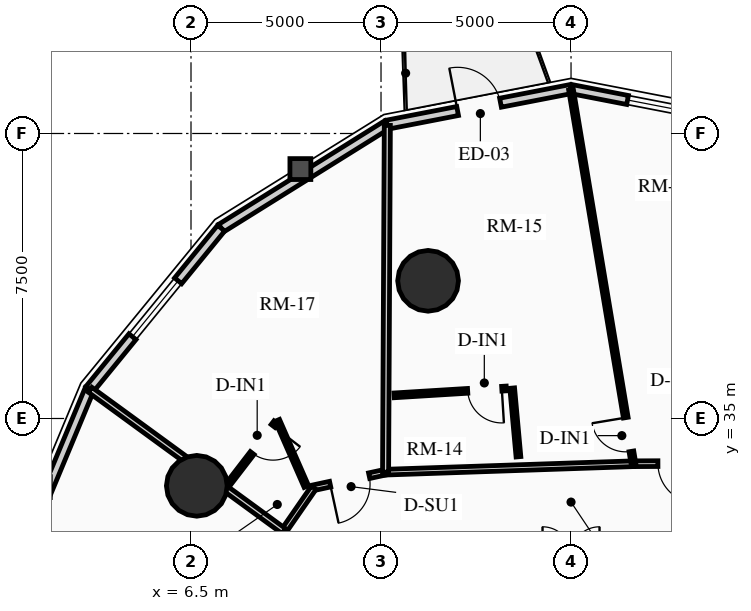
"""IFC4 building model, lengths in metres.
Left out: names, types, materials, properties, quantities, classifications, styles, units other than length and angle.
Written with IfcOpenShell. Run it as: python <this file> out.ifc"""

import sys

from ifc_helpers import new_model, si_unit, direction, frame, frame_2d, origin, origin_2d, place, context, subcontext, project, spatial, rectangle, circle, extrude, source, transform, mapped, element, fill, save


model = new_model("IFC4")
c1 = context("Model", 3, precision=1e-05, world=origin(), true_north=direction((0.0, 1.0)))
c2 = subcontext(c1, "Body", "Model", "MODEL_VIEW")
j1 = project(units=[si_unit("LENGTHUNIT", "METRE"), si_unit("PLANEANGLEUNIT", "RADIAN")], contexts=[c1])
p1 = place(None, origin())
s1 = spatial("IfcSite", under=j1, at=p1, CompositionType="ELEMENT")
p2 = place(p1, origin())
s2 = spatial("IfcBuilding", under=s1, at=p2, CompositionType="ELEMENT")
p3 = place(p2, frame((0.0, 0.0, 51.1)))
s3 = spatial("IfcBuildingStorey", under=s2, at=p3, CompositionType="ELEMENT", Elevation=51.1)
for number, where, z_axis, x_axis in (
    (1, (12.739, 38.623, 0.0), (0.0, 0.0, 1.0), (1.0, 0.0, 0.0)),
    (2, (6.653, 33.229, 0.0), (0.0, 0.0, 1.0), (1.0, 0.0, 0.0)),
):
    element("IfcColumn", number, at=place(p3, frame(where, z_axis=z_axis, x_axis=x_axis)), inside=s3, PredefinedType="USERDEFINED", context=c2, shape_type="SweptSolid", body=[
        extrude(circle(Radius=0.8, at=origin_2d()), origin(), (0.0, 0.0, 1.0), 2.91),
    ])
p4 = place(p3, frame((16.5, 43.67, 0.0), z_axis=(0.0, 0.0, 1.0), x_axis=(0.981725274071, -0.190303668512, 0.0)))
e3 = element("IfcWall", 3, at=p4, inside=s3, PredefinedType="SOLIDWALL", context=c2, shape_type="SweptSolid", body=[
    extrude(rectangle(XDim=4.93, YDim=0.24, at=frame_2d((2.465, 0.0))), origin(), (0.0, 0.0, 1.0), 2.073),
])
m1 = source(origin(), c2, "Body", "SweptSolid", [
    extrude(rectangle(XDim=1.9, YDim=1.35, at=frame_2d((0.95, 0.675))), frame((0.0, 0.13, 0.0), z_axis=(0.0, -1.0, 0.0), x_axis=(1.0, 0.0, 0.0)), (0.0, 0.0, 1.0), 0.26),
])
p5 = place(p4, frame((1.515, 0.0, 0.65)))
e4 = element("IfcOpeningElement", 4, at=p5, cuts=e3, PredefinedType="OPENING", context=c2, shape_type="MappedRepresentation", body=[
    mapped(m1, transform((0.0, 0.0, 0.0), x_axis=(1.0, 0.0, 0.0), y_axis=(0.0, 1.0, 0.0), z_axis=(0.0, 0.0, 1.0), scale=1.0)),
])
p6 = place(p3, frame((11.66, 42.732, 0.0), z_axis=(0.0, 0.0, 1.0), x_axis=(0.981725274071, 0.190303668512, 0.0)))
e5 = element("IfcWall", 5, at=p6, inside=s3, PredefinedType="SOLIDWALL", context=c2, shape_type="SweptSolid", body=[
    extrude(rectangle(XDim=4.93, YDim=0.24, at=frame_2d((2.465, 0.0))), origin(), (0.0, 0.0, 1.0), 2.073),
])
m2 = source(origin(), c2, "Body", "SweptSolid", [
    extrude(rectangle(XDim=1.15, YDim=2.005, at=frame_2d((0.575, 1.002))), frame((0.0, 0.13, 0.0), z_axis=(0.0, -1.0, 0.0), x_axis=(1.0, 0.0, 0.0)), (0.0, 0.0, 1.0), 0.26),
])
p7 = place(p6, frame((1.89, 0.0, 0.0)))
e6 = element("IfcOpeningElement", 6, at=p7, cuts=e5, PredefinedType="OPENING", context=c2, shape_type="MappedRepresentation", body=[
    mapped(m2, transform((0.0, 0.0, 0.0), x_axis=(1.0, 0.0, 0.0), y_axis=(0.0, 1.0, 0.0), z_axis=(0.0, 0.0, 1.0), scale=1.0)),
])
p8 = place(p3, frame((7.293, 40.009, 0.0), z_axis=(0.0, 0.0, 1.0), x_axis=(0.848533613342, 0.529141481107, 0.0)))
e7 = element("IfcWall", 7, at=p8, inside=s3, PredefinedType="SOLIDWALL", context=c2, shape_type="SweptSolid", body=[
    extrude(rectangle(XDim=5.146, YDim=0.24, at=frame_2d((2.573, 0.0))), origin(), (0.0, 0.0, 1.0), 2.073),
])
p9 = place(p3, frame((3.828, 35.768, 0.0), z_axis=(0.0, 0.0, 1.0), x_axis=(0.632713287022, 0.77438614168, 0.0)))
e8 = element("IfcWall", 8, at=p9, inside=s3, PredefinedType="SOLIDWALL", context=c2, shape_type="SweptSolid", body=[
    extrude(rectangle(XDim=5.477, YDim=0.24, at=frame_2d((2.738, 0.0))), origin(), (0.0, 0.0, 1.0), 2.073),
])
p10 = place(p9, frame((1.788, 0.0, 0.65)))
e9 = element("IfcOpeningElement", 9, at=p10, cuts=e8, PredefinedType="OPENING", context=c2, shape_type="MappedRepresentation", body=[
    mapped(m1, transform((0.0, 0.0, 0.0), x_axis=(1.0, 0.0, 0.0), y_axis=(0.0, 1.0, 0.0), z_axis=(0.0, 0.0, 1.0), scale=1.0)),
])
p11 = place(p3, frame((1.604, 30.424, 0.0), z_axis=(0.0, 0.0, 1.0), x_axis=(0.384348836956, 0.923187939442, 0.0)))
e10 = element("IfcWall", 10, at=p11, inside=s3, PredefinedType="SOLIDWALL", context=c2, shape_type="SweptSolid", body=[
    extrude(rectangle(XDim=5.789, YDim=0.24, at=frame_2d((2.894, 0.0))), origin(), (0.0, 0.0, 1.0), 2.073),
])
p12 = place(p3, frame((21.527, 33.824, 0.0), z_axis=(0.0, 0.0, 1.0), x_axis=(-0.999990631344, -0.00432865146, 0.0)))
e11 = element("IfcWall", 11, at=p12, inside=s3, PredefinedType="PARTITIONING", context=c2, shape_type="SweptSolid", body=[
    extrude(rectangle(XDim=3.384, YDim=0.15, at=frame_2d((1.692, 0.0))), origin(), (0.0, 0.0, 1.0), 2.159),
])
m3 = source(origin(), c2, "Body", "SweptSolid", [
    extrude(rectangle(XDim=1.05, YDim=2.015, at=frame_2d((0.525, 1.007))), frame((0.0, 0.085, 0.0), z_axis=(0.0, -1.0, 0.0), x_axis=(1.0, 0.0, 0.0)), (0.0, 0.0, 1.0), 0.17),
])
p13 = place(p12, frame((1.69, 0.0, 0.0)))
e12 = element("IfcOpeningElement", 12, at=p13, cuts=e11, PredefinedType="OPENING", context=c2, shape_type="MappedRepresentation", body=[
    mapped(m3, transform((0.0, 0.0, 0.0), x_axis=(1.0, 0.0, 0.0), y_axis=(0.0, 1.0, 0.0), z_axis=(0.0, 0.0, 1.0), scale=1.0)),
])
p14 = place(p3, frame((18.143, 33.81, 0.0), z_axis=(0.0, 0.0, 1.0), x_axis=(-0.999423023908, -0.033964971394, 0.0)))
e13 = element("IfcWall", 13, at=p14, inside=s3, PredefinedType="PARTITIONING", context=c2, shape_type="SweptSolid", body=[
    extrude(rectangle(XDim=6.527, YDim=0.15, at=frame_2d((3.263, 0.0))), origin(), (0.0, 0.0, 1.0), 2.159),
])
p15 = place(p3, frame((11.62, 33.588, 0.0), z_axis=(0.0, 0.0, 1.0), x_axis=(-0.977392314559, -0.211433827571, 0.0)))
e14 = element("IfcWall", 14, at=p15, inside=s3, PredefinedType="PARTITIONING", context=c2, shape_type="SweptSolid", body=[
    extrude(rectangle(XDim=1.934, YDim=0.15, at=frame_2d((0.967, 0.0))), origin(), (0.0, 0.0, 1.0), 2.159),
])
p16 = place(p15, frame((0.442, 0.0, 0.0)))
e15 = element("IfcOpeningElement", 15, at=p16, cuts=e14, PredefinedType="OPENING", context=c2, shape_type="MappedRepresentation", body=[
    mapped(m3, transform((0.0, 0.0, 0.0), x_axis=(1.0, 0.0, 0.0), y_axis=(0.0, 1.0, 0.0), z_axis=(0.0, 0.0, 1.0), scale=1.0)),
])
p17 = place(p3, frame((9.729, 33.179, 0.0), z_axis=(0.0, 0.0, 1.0), x_axis=(-0.569155068352, -0.822230203878, 0.0)))
e16 = element("IfcWall", 16, at=p17, inside=s3, PredefinedType="PARTITIONING", context=c2, shape_type="SweptSolid", body=[
    extrude(rectangle(XDim=1.387, YDim=0.15, at=frame_2d((0.694, 0.0))), origin(), (0.0, 0.0, 1.0), 2.159),
])
p18 = place(p3, frame((8.94, 32.038, 0.0), z_axis=(0.0, 0.0, 1.0), x_axis=(-0.159917336462, -0.987130409571, 0.0)))
e17 = element("IfcWall", 17, at=p18, inside=s3, PredefinedType="PARTITIONING", context=c2, shape_type="SweptSolid", body=[
    extrude(rectangle(XDim=1.547, YDim=0.15, at=frame_2d((0.773, 0.0))), origin(), (0.0, 0.0, 1.0), 2.205),
])
p19 = place(p18, frame((0.377, 0.0, 0.0)))
e18 = element("IfcOpeningElement", 18, at=p19, cuts=e17, PredefinedType="OPENING", context=c2, shape_type="MappedRepresentation", body=[
    mapped(m3, transform((0.0, 0.0, 0.0), x_axis=(1.0, 0.0, 0.0), y_axis=(0.0, 1.0, 0.0), z_axis=(0.0, 0.0, 1.0), scale=1.0)),
])
p20 = place(p3, frame((11.62, 33.588, 0.0), z_axis=(0.0, 0.0, 1.0), x_axis=(0.005056791532, 0.999987214348, 0.0)))
e19 = element("IfcWall", 19, at=p20, inside=s3, PredefinedType="PARTITIONING", context=c2, shape_type="SweptSolid", body=[
    extrude(rectangle(XDim=9.125, YDim=0.16, at=frame_2d((4.562, 0.0))), origin(), (0.0, 0.0, 1.0), 2.073),
])
p21 = place(p3, frame((8.94, 32.038, 0.0), z_axis=(0.0, 0.0, 1.0), x_axis=(-0.807831293846, 0.58941377714, 0.0)))
e20 = element("IfcWall", 20, at=p21, inside=s3, PredefinedType="PARTITIONING", context=c2, shape_type="SweptSolid", body=[
    extrude(rectangle(XDim=6.308, YDim=0.16, at=frame_2d((3.154, 0.0))), origin(), (0.0, 0.0, 1.0), 2.073),
])
p22 = place(p3, frame((18.143, 33.81, 0.0), z_axis=(0.0, 0.0, 1.0), x_axis=(-0.164668829219, 0.986348912243, 0.0)))
e21 = element("IfcWall", 21, at=p22, inside=s3, PredefinedType="PARTITIONING", context=c2, shape_type="SweptSolid", body=[
    extrude(rectangle(XDim=9.977, YDim=0.125, at=frame_2d((4.988, 0.0))), origin(), (0.0, 0.0, 1.0), 2.073),
])
m4 = source(origin(), c2, "Body", "SweptSolid", [
    extrude(rectangle(XDim=0.9, YDim=2.005, at=frame_2d((0.45, 1.002))), frame((0.0, 0.073, 0.0), z_axis=(0.0, -1.0, 0.0), x_axis=(1.0, 0.0, 0.0)), (0.0, 0.0, 1.0), 0.145),
])
p23 = place(p22, frame((0.33, 0.0, 0.0)))
e22 = element("IfcOpeningElement", 22, at=p23, cuts=e21, PredefinedType="OPENING", context=c2, shape_type="MappedRepresentation", body=[
    mapped(m4, transform((0.0, 0.0, 0.0), x_axis=(1.0, 0.0, 0.0), y_axis=(0.0, 1.0, 0.0), z_axis=(0.0, 0.0, 1.0), scale=1.0)),
])
p24 = place(p3, frame((15.116, 33.993, 0.0), z_axis=(0.0, 0.0, 1.0), x_axis=(-0.090547877021, 0.995892103577, 0.0)))
e23 = element("IfcWall", 23, at=p24, inside=s3, PredefinedType="PARTITIONING", context=c2, shape_type="SweptSolid", body=[
    extrude(rectangle(XDim=1.815, YDim=0.125, at=frame_2d((0.907, 0.0))), origin(), (0.0, 0.0, 1.0), 2.635),
])
p25 = place(p3, frame((14.798, 35.791, 0.0), z_axis=(0.0, 0.0, 1.0), x_axis=(-0.998108365817, -0.06147918417, 0.0)))
e24 = element("IfcWall", 24, at=p25, inside=s3, PredefinedType="PARTITIONING", context=c2, shape_type="SweptSolid", body=[
    extrude(rectangle(XDim=2.958, YDim=0.125, at=frame_2d((1.479, 0.0))), origin(), (0.0, 0.0, 1.0), 2.159),
])
p26 = place(p25, frame((0.12, 0.0, 0.0)))
e25 = element("IfcOpeningElement", 25, at=p26, cuts=e24, PredefinedType="OPENING", context=c2, shape_type="MappedRepresentation", body=[
    mapped(m4, transform((0.0, 0.0, 0.0), x_axis=(1.0, 0.0, 0.0), y_axis=(0.0, 1.0, 0.0), z_axis=(0.0, 0.0, 1.0), scale=1.0)),
])
p27 = place(p3, frame((9.535, 33.211, 0.0), z_axis=(0.0, 0.0, 1.0), x_axis=(-0.401687955793, 0.915776602765, 0.0)))
e26 = element("IfcWall", 26, at=p27, inside=s3, PredefinedType="PARTITIONING", context=c2, shape_type="SweptSolid", body=[
    extrude(rectangle(XDim=1.901, YDim=0.125, at=frame_2d((0.95, 0.0))), origin(), (0.0, 0.0, 1.0), 2.635),
])
p28 = place(p3, frame((8.732, 34.899, 0.0), z_axis=(0.0, 0.0, 1.0), x_axis=(-0.609677010074, -0.792649950096, 0.0)))
e27 = element("IfcWall", 27, at=p28, inside=s3, PredefinedType="PARTITIONING", context=c2, shape_type="SweptSolid", body=[
    extrude(rectangle(XDim=2.097, YDim=0.125, at=frame_2d((1.049, 0.0))), origin(), (0.0, 0.0, 1.0), 2.073),
])
p29 = place(p28, frame((0.12, 0.0, 0.0)))
e28 = element("IfcOpeningElement", 28, at=p29, cuts=e27, PredefinedType="OPENING", context=c2, shape_type="MappedRepresentation", body=[
    mapped(m4, transform((0.0, 0.0, 0.0), x_axis=(1.0, 0.0, 0.0), y_axis=(0.0, 1.0, 0.0), z_axis=(0.0, 0.0, 1.0), scale=1.0)),
])
m5 = source(origin(), c2, "Body", "SweptSolid", [
    extrude(rectangle(XDim=1.9, YDim=1.35, at=frame_2d((0.95, 0.675))), frame((0.0, 0.03, 0.0), z_axis=(0.0, -1.0, 0.0), x_axis=(1.0, 0.0, 0.0)), (0.0, 0.0, 1.0), 0.06),
])
p30 = place(p5, origin())
e29 = element("IfcWindow", 29, at=p30, inside=s3, PartitioningType="DOUBLE_PANEL_VERTICAL", PredefinedType="WINDOW", context=c2, shape_type="MappedRepresentation", body=[
    mapped(m5, transform((0.0, 0.0, 0.0), x_axis=(1.0, 0.0, 0.0), y_axis=(0.0, 1.0, 0.0), z_axis=(0.0, 0.0, 1.0), scale=1.0)),
])
fill(e4, e29)
m6 = source(origin(), c2, "Body", "SweptSolid", [
    extrude(rectangle(XDim=1.15, YDim=2.005, at=frame_2d((0.575, 1.002))), frame((0.0, 0.025, 0.0), z_axis=(0.0, -1.0, 0.0), x_axis=(1.0, 0.0, 0.0)), (0.0, 0.0, 1.0), 0.05),
])
p31 = place(p7, origin())
e30 = element("IfcDoor", 30, at=p31, inside=s3, OperationType="SINGLE_SWING_LEFT", PredefinedType="DOOR", context=c2, shape_type="MappedRepresentation", body=[
    mapped(m6, transform((0.0, 0.0, 0.0), x_axis=(1.0, 0.0, 0.0), y_axis=(0.0, 1.0, 0.0), z_axis=(0.0, 0.0, 1.0), scale=1.0)),
])
fill(e6, e30)
p32 = place(p10, origin())
e31 = element("IfcWindow", 31, at=p32, inside=s3, PartitioningType="DOUBLE_PANEL_VERTICAL", PredefinedType="WINDOW", context=c2, shape_type="MappedRepresentation", body=[
    mapped(m5, transform((0.0, 0.0, 0.0), x_axis=(1.0, 0.0, 0.0), y_axis=(0.0, 1.0, 0.0), z_axis=(0.0, 0.0, 1.0), scale=1.0)),
])
fill(e9, e31)
m7 = source(origin(), c2, "Body", "SweptSolid", [
    extrude(rectangle(XDim=1.05, YDim=2.015, at=frame_2d((0.525, 1.007))), frame((0.0, 0.025, 0.0), z_axis=(0.0, -1.0, 0.0), x_axis=(1.0, 0.0, 0.0)), (0.0, 0.0, 1.0), 0.05),
])
p33 = place(p13, origin())
e32 = element("IfcDoor", 32, at=p33, inside=s3, OperationType="SINGLE_SWING_LEFT", PredefinedType="DOOR", context=c2, shape_type="MappedRepresentation", body=[
    mapped(m7, transform((0.0, 0.0, 0.0), x_axis=(1.0, 0.0, 0.0), y_axis=(0.0, 1.0, 0.0), z_axis=(0.0, 0.0, 1.0), scale=1.0)),
])
fill(e12, e32)
m8 = source(origin(), c2, "Body", "SweptSolid", [
    extrude(rectangle(XDim=0.9, YDim=2.005, at=frame_2d((0.45, 1.002))), frame((0.0, 0.025, 0.0), z_axis=(0.0, -1.0, 0.0), x_axis=(1.0, 0.0, 0.0)), (0.0, 0.0, 1.0), 0.05),
])
p34 = place(p23, origin())
e33 = element("IfcDoor", 33, at=p34, inside=s3, OperationType="SINGLE_SWING_RIGHT", PredefinedType="DOOR", context=c2, shape_type="MappedRepresentation", body=[
    mapped(m8, transform((0.0, 0.0, 0.0), x_axis=(1.0, 0.0, 0.0), y_axis=(0.0, 1.0, 0.0), z_axis=(0.0, 0.0, 1.0), scale=1.0)),
])
fill(e22, e33)
p35 = place(p26, origin())
e34 = element("IfcDoor", 34, at=p35, inside=s3, OperationType="SINGLE_SWING_LEFT", PredefinedType="DOOR", context=c2, shape_type="MappedRepresentation", body=[
    mapped(m8, transform((0.0, 0.0, 0.0), x_axis=(1.0, 0.0, 0.0), y_axis=(0.0, 1.0, 0.0), z_axis=(0.0, 0.0, 1.0), scale=1.0)),
])
fill(e25, e34)
p36 = place(p16, origin())
e35 = element("IfcDoor", 35, at=p36, inside=s3, OperationType="SINGLE_SWING_RIGHT", PredefinedType="DOOR", context=c2, shape_type="MappedRepresentation", body=[
    mapped(m7, transform((0.0, 0.0, 0.0), x_axis=(1.0, 0.0, 0.0), y_axis=(0.0, 1.0, 0.0), z_axis=(0.0, 0.0, 1.0), scale=1.0)),
])
fill(e15, e35)
p37 = place(p29, origin())
e36 = element("IfcDoor", 36, at=p37, inside=s3, OperationType="SINGLE_SWING_LEFT", PredefinedType="DOOR", context=c2, shape_type="MappedRepresentation", body=[
    mapped(m8, transform((0.0, 0.0, 0.0), x_axis=(1.0, 0.0, 0.0), y_axis=(0.0, 1.0, 0.0), z_axis=(0.0, 0.0, 1.0), scale=1.0)),
])
fill(e28, e36)
save(model, sys.argv[1])
